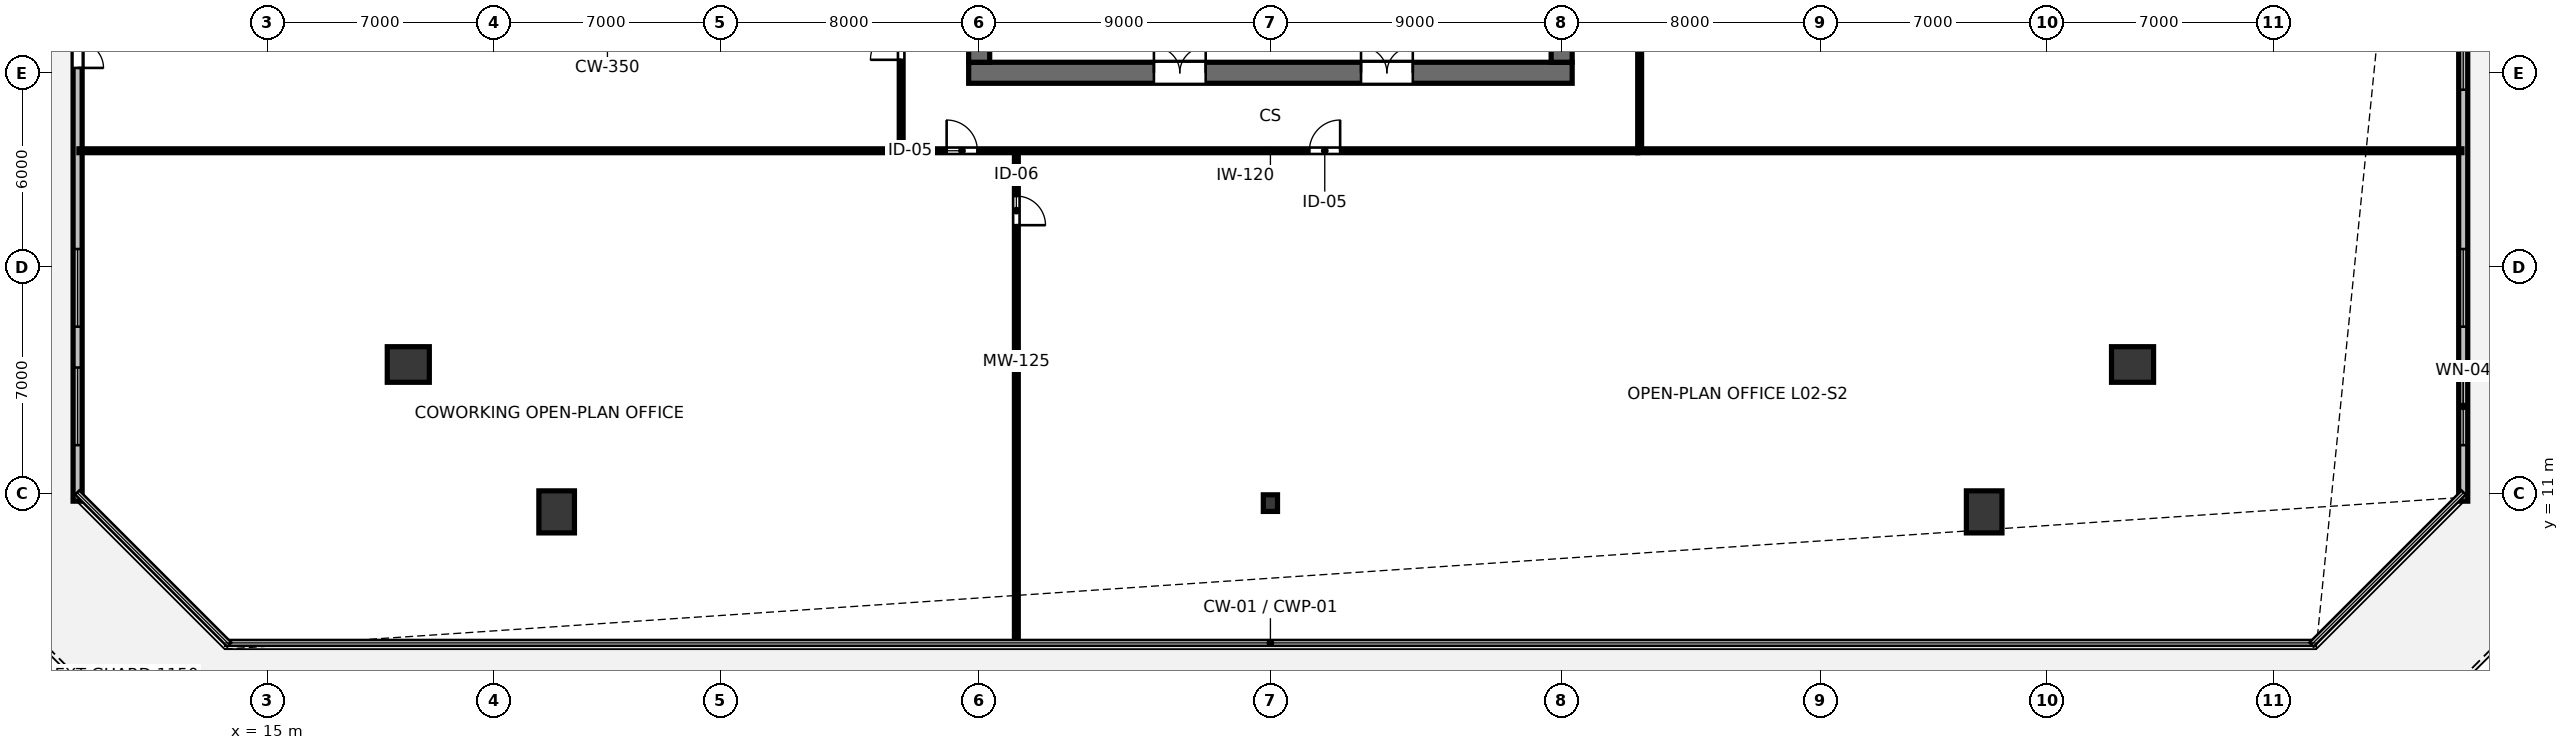
"""IFC4 building model, lengths in metres.
Left out: names, types, materials, properties, quantities, classifications, styles, units other than length and angle.
Written with IfcOpenShell. Run it as: python <this file> out.ifc"""

import sys

from ifc_helpers import new_model, si_unit, direction, frame, frame_2d, origin, origin_2d, place, context, subcontext, project, spatial, rectangle, hollow_rectangle, i_section, extrude, element, fill, save


model = new_model("IFC4")
c1 = context("Model", 3, precision=1e-05, world=origin(), true_north=direction((0.0, 1.0)))
c2 = subcontext(c1, "Body", "Model", "MODEL_VIEW")
j1 = project(units=[si_unit("LENGTHUNIT", "METRE"), si_unit("PLANEANGLEUNIT", "RADIAN")], contexts=[c1])
p1 = place(None, origin())
s1 = spatial("IfcSite", under=j1, at=p1, CompositionType="ELEMENT")
p2 = place(p1, origin())
s2 = spatial("IfcBuilding", under=s1, at=p2, CompositionType="ELEMENT")
p3 = place(p2, frame((0.0, 0.0, 9.5)))
s3 = spatial("IfcBuildingStorey", under=s2, at=p3, CompositionType="ELEMENT", Elevation=9.5)
p4 = place(p3, frame((36.675, 24.0, 0.0), z_axis=(0.0, 0.0, 1.0), x_axis=(1.0, 0.0, 0.0)))
e1 = element("IfcWall", 1, at=p4, inside=s3, PredefinedType="SHEAR", context=c2, shape_type="SweptSolid", body=[
    extrude(rectangle(XDim=18.65, YDim=0.65, at=frame_2d((9.325, 0.0))), origin(), (0.0, 0.0, 1.0), 4.22),
])
p5 = place(p4, frame((5.725, 0.0, 0.0)))
e2 = element("IfcOpeningElement", 2, at=p5, cuts=e1, PredefinedType="OPENING", context=c2, shape_type="SweptSolid", body=[
    extrude(rectangle(XDim=1.6, YDim=2.15, at=frame_2d((0.8, 1.075))), frame((0.0, 0.335, 0.0), z_axis=(0.0, -1.0, 0.0), x_axis=(1.0, 0.0, 0.0)), (0.0, 0.0, 1.0), 0.67),
])
p6 = place(p4, frame((12.125, 0.0, 0.0)))
e3 = element("IfcOpeningElement", 3, at=p6, cuts=e1, PredefinedType="OPENING", context=c2, shape_type="SweptSolid", body=[
    extrude(rectangle(XDim=1.6, YDim=2.15, at=frame_2d((0.8, 1.075))), frame((0.0, 0.335, 0.0), z_axis=(0.0, -1.0, 0.0), x_axis=(1.0, 0.0, 0.0)), (0.0, 0.0, 1.0), 0.67),
])
p7 = place(p3, frame((37.0, 24.325, 0.0), z_axis=(0.0, 0.0, 1.0), x_axis=(0.0, 1.0, 0.0)))
e4 = element("IfcWall", 4, at=p7, inside=s3, PredefinedType="SHEAR", context=c2, shape_type="SweptSolid", body=[
    extrude(rectangle(XDim=15.35, YDim=0.65, at=frame_2d((7.675, 0.0))), origin(), (0.0, 0.0, 1.0), 4.22),
])
p8 = place(p7, frame((5.2, 0.0, 0.0)))
e5 = element("IfcOpeningElement", 5, at=p8, cuts=e4, PredefinedType="OPENING", context=c2, shape_type="SweptSolid", body=[
    extrude(rectangle(XDim=1.15, YDim=2.15, at=frame_2d((0.575, 1.075))), frame((0.0, 0.335, 0.0), z_axis=(0.0, -1.0, 0.0), x_axis=(1.0, 0.0, 0.0)), (0.0, 0.0, 1.0), 0.67),
])
p9 = place(p3, frame((55.0, 24.325, 0.0), z_axis=(0.0, 0.0, 1.0), x_axis=(0.0, 1.0, 0.0)))
e6 = element("IfcWall", 6, at=p9, inside=s3, PredefinedType="SHEAR", context=c2, shape_type="SweptSolid", body=[
    extrude(rectangle(XDim=15.35, YDim=0.65, at=frame_2d((7.675, 0.0))), origin(), (0.0, 0.0, 1.0), 4.22),
])
p10 = place(p9, frame((5.2, 0.0, 0.0)))
e7 = element("IfcOpeningElement", 7, at=p10, cuts=e6, PredefinedType="OPENING", context=c2, shape_type="SweptSolid", body=[
    extrude(rectangle(XDim=1.15, YDim=2.15, at=frame_2d((0.575, 1.075))), frame((0.0, 0.335, 0.0), z_axis=(0.0, -1.0, 0.0), x_axis=(1.0, 0.0, 0.0)), (0.0, 0.0, 1.0), 0.67),
])
p11 = place(p3, frame((23.943, 10.429, 0.0), z_axis=(0.0, 0.0, 1.0), x_axis=(1.0, 0.0, 0.0)))
e8 = element("IfcColumn", 8, at=p11, inside=s3, PredefinedType="COLUMN", context=c2, shape_type="SweptSolid", body=[
    extrude(hollow_rectangle(XDim=1.1, YDim=1.3, WallThickness=0.07, at=origin_2d()), origin(), (0.0, 0.0, 1.0), 4.208),
])
p12 = place(p3, frame((46.0, 10.7, 0.0), z_axis=(0.0, 0.0, 1.0), x_axis=(1.0, 0.0, 0.0)))
e9 = element("IfcColumn", 9, at=p12, inside=s3, PredefinedType="COLUMN", context=c2, shape_type="SweptSolid", body=[
    extrude(i_section(OverallWidth=0.439, OverallDepth=0.514, WebThickness=0.06, FlangeThickness=0.097, FilletRadius=0.025, at=origin_2d()), origin(), (0.0, 0.0, 1.0), 4.208),
])
for number, where, z_axis, x_axis in (
    (10, (68.057, 10.429, 0.0), (0.0, 0.0, 1.0), (1.0, 0.0, 0.0)),
    (11, (72.642, 14.984, 0.0), (0.0, 0.0, 1.0), (0.0, 1.0, 0.0)),
    (12, (19.358, 14.984, 0.0), (0.0, 0.0, 1.0), (0.0, 1.0, 0.0)),
):
    element("IfcColumn", number, at=place(p3, frame(where, z_axis=z_axis, x_axis=x_axis)), inside=s3, PredefinedType="COLUMN", context=c2, shape_type="SweptSolid", body=[
        extrude(hollow_rectangle(XDim=1.1, YDim=1.3, WallThickness=0.07, at=origin_2d()), origin(), (0.0, 0.0, 1.0), 4.208),
    ])
p13 = place(p3, frame((82.86, 10.76, 0.0), z_axis=(0.0, 0.0, 1.0), x_axis=(0.0, 1.0, 0.0)))
e13 = element("IfcWall", 13, at=p13, inside=s3, PredefinedType="STANDARD", context=c2, shape_type="SweptSolid", body=[
    extrude(rectangle(XDim=42.48, YDim=0.28, at=frame_2d((21.24, 0.0))), origin(), (0.0, 0.0, 1.0), 4.21),
])
p14 = place(p13, frame((25.64, 0.0, 0.0)))
e14 = element("IfcOpeningElement", 14, at=p14, cuts=e13, PredefinedType="OPENING", context=c2, shape_type="SweptSolid", body=[
    extrude(rectangle(XDim=1.6, YDim=2.15, at=frame_2d((0.8, 1.075))), frame((0.0, 0.15, 0.0), z_axis=(0.0, -1.0, 0.0), x_axis=(1.0, 0.0, 0.0)), (0.0, 0.0, 1.0), 0.3),
])
p15 = place(p13, frame((1.731, 0.0, 0.85)))
e15 = element("IfcOpeningElement", 15, at=p15, cuts=e13, PredefinedType="OPENING", context=c2, shape_type="SweptSolid", body=[
    extrude(rectangle(XDim=2.4, YDim=2.4, at=frame_2d((1.2, 1.2))), frame((0.0, 0.15, 0.0), z_axis=(0.0, -1.0, 0.0), x_axis=(1.0, 0.0, 0.0)), (0.0, 0.0, 1.0), 0.3),
])
p16 = place(p13, frame((5.393, 0.0, 0.85)))
e16 = element("IfcOpeningElement", 16, at=p16, cuts=e13, PredefinedType="OPENING", context=c2, shape_type="SweptSolid", body=[
    extrude(rectangle(XDim=2.4, YDim=2.4, at=frame_2d((1.2, 1.2))), frame((0.0, 0.15, 0.0), z_axis=(0.0, -1.0, 0.0), x_axis=(1.0, 0.0, 0.0)), (0.0, 0.0, 1.0), 0.3),
])
p17 = place(p13, frame((12.716, 0.0, 0.85)))
e17 = element("IfcOpeningElement", 17, at=p17, cuts=e13, PredefinedType="OPENING", context=c2, shape_type="SweptSolid", body=[
    extrude(rectangle(XDim=2.4, YDim=2.4, at=frame_2d((1.2, 1.2))), frame((0.0, 0.15, 0.0), z_axis=(0.0, -1.0, 0.0), x_axis=(1.0, 0.0, 0.0)), (0.0, 0.0, 1.0), 0.3),
])
p18 = place(p13, frame((16.378, 0.0, 0.85)))
e18 = element("IfcOpeningElement", 18, at=p18, cuts=e13, PredefinedType="OPENING", context=c2, shape_type="SweptSolid", body=[
    extrude(rectangle(XDim=2.4, YDim=2.4, at=frame_2d((1.2, 1.2))), frame((0.0, 0.15, 0.0), z_axis=(0.0, -1.0, 0.0), x_axis=(1.0, 0.0, 0.0)), (0.0, 0.0, 1.0), 0.3),
])
p19 = place(p13, frame((20.04, 0.0, 0.85)))
e19 = element("IfcOpeningElement", 19, at=p19, cuts=e13, PredefinedType="OPENING", context=c2, shape_type="SweptSolid", body=[
    extrude(rectangle(XDim=2.4, YDim=2.4, at=frame_2d((1.2, 1.2))), frame((0.0, 0.15, 0.0), z_axis=(0.0, -1.0, 0.0), x_axis=(1.0, 0.0, 0.0)), (0.0, 0.0, 1.0), 0.3),
])
p20 = place(p13, frame((34.687, 0.0, 0.85)))
e20 = element("IfcOpeningElement", 20, at=p20, cuts=e13, PredefinedType="OPENING", context=c2, shape_type="SweptSolid", body=[
    extrude(rectangle(XDim=2.4, YDim=2.4, at=frame_2d((1.2, 1.2))), frame((0.0, 0.15, 0.0), z_axis=(0.0, -1.0, 0.0), x_axis=(1.0, 0.0, 0.0)), (0.0, 0.0, 1.0), 0.3),
])
p21 = place(p13, frame((38.349, 0.0, 0.85)))
e21 = element("IfcOpeningElement", 21, at=p21, cuts=e13, PredefinedType="OPENING", context=c2, shape_type="SweptSolid", body=[
    extrude(rectangle(XDim=2.4, YDim=2.4, at=frame_2d((1.2, 1.2))), frame((0.0, 0.15, 0.0), z_axis=(0.0, -1.0, 0.0), x_axis=(1.0, 0.0, 0.0)), (0.0, 0.0, 1.0), 0.3),
])
p22 = place(p3, frame((9.14, 53.24, 0.0), z_axis=(0.0, 0.0, 1.0), x_axis=(0.0, -1.0, 0.0)))
e22 = element("IfcWall", 22, at=p22, inside=s3, PredefinedType="STANDARD", context=c2, shape_type="SweptSolid", body=[
    extrude(rectangle(XDim=42.48, YDim=0.28, at=frame_2d((21.24, 0.0))), origin(), (0.0, 0.0, 1.0), 4.21),
])
p23 = place(p22, frame((27.49, 0.0, 0.0)))
e23 = element("IfcOpeningElement", 23, at=p23, cuts=e22, PredefinedType="OPENING", context=c2, shape_type="SweptSolid", body=[
    extrude(rectangle(XDim=1.6, YDim=2.15, at=frame_2d((0.8, 1.075))), frame((0.0, 0.15, 0.0), z_axis=(0.0, -1.0, 0.0), x_axis=(1.0, 0.0, 0.0)), (0.0, 0.0, 1.0), 0.3),
])
p24 = place(p22, frame((1.731, 0.0, 0.85)))
e24 = element("IfcOpeningElement", 24, at=p24, cuts=e22, PredefinedType="OPENING", context=c2, shape_type="SweptSolid", body=[
    extrude(rectangle(XDim=2.4, YDim=2.4, at=frame_2d((1.2, 1.2))), frame((0.0, 0.15, 0.0), z_axis=(0.0, -1.0, 0.0), x_axis=(1.0, 0.0, 0.0)), (0.0, 0.0, 1.0), 0.3),
])
p25 = place(p22, frame((5.393, 0.0, 0.85)))
e25 = element("IfcOpeningElement", 25, at=p25, cuts=e22, PredefinedType="OPENING", context=c2, shape_type="SweptSolid", body=[
    extrude(rectangle(XDim=2.4, YDim=2.4, at=frame_2d((1.2, 1.2))), frame((0.0, 0.15, 0.0), z_axis=(0.0, -1.0, 0.0), x_axis=(1.0, 0.0, 0.0)), (0.0, 0.0, 1.0), 0.3),
])
p26 = place(p22, frame((12.716, 0.0, 0.85)))
e26 = element("IfcOpeningElement", 26, at=p26, cuts=e22, PredefinedType="OPENING", context=c2, shape_type="SweptSolid", body=[
    extrude(rectangle(XDim=2.4, YDim=2.4, at=frame_2d((1.2, 1.2))), frame((0.0, 0.15, 0.0), z_axis=(0.0, -1.0, 0.0), x_axis=(1.0, 0.0, 0.0)), (0.0, 0.0, 1.0), 0.3),
])
p27 = place(p22, frame((20.04, 0.0, 0.85)))
e27 = element("IfcOpeningElement", 27, at=p27, cuts=e22, PredefinedType="OPENING", context=c2, shape_type="SweptSolid", body=[
    extrude(rectangle(XDim=2.4, YDim=2.4, at=frame_2d((1.2, 1.2))), frame((0.0, 0.15, 0.0), z_axis=(0.0, -1.0, 0.0), x_axis=(1.0, 0.0, 0.0)), (0.0, 0.0, 1.0), 0.3),
])
p28 = place(p22, frame((34.687, 0.0, 0.85)))
e28 = element("IfcOpeningElement", 28, at=p28, cuts=e22, PredefinedType="OPENING", context=c2, shape_type="SweptSolid", body=[
    extrude(rectangle(XDim=2.4, YDim=2.4, at=frame_2d((1.2, 1.2))), frame((0.0, 0.15, 0.0), z_axis=(0.0, -1.0, 0.0), x_axis=(1.0, 0.0, 0.0)), (0.0, 0.0, 1.0), 0.3),
])
p29 = place(p22, frame((38.349, 0.0, 0.85)))
e29 = element("IfcOpeningElement", 29, at=p29, cuts=e22, PredefinedType="OPENING", context=c2, shape_type="SweptSolid", body=[
    extrude(rectangle(XDim=2.4, YDim=2.4, at=frame_2d((1.2, 1.2))), frame((0.0, 0.15, 0.0), z_axis=(0.0, -1.0, 0.0), x_axis=(1.0, 0.0, 0.0)), (0.0, 0.0, 1.0), 0.3),
])
p30 = place(p3, frame((38.149, 21.59, 0.0), z_axis=(0.0, 0.0, 1.0), x_axis=(0.0, -1.0, 0.0)))
e30 = element("IfcWall", 30, at=p30, inside=s3, PredefinedType="MOVABLE", context=c2, shape_type="SweptSolid", body=[
    extrude(rectangle(XDim=15.21, YDim=0.12, at=frame_2d((7.605, 0.0))), origin(), (0.0, 0.0, 1.0), 3.31),
])
p31 = place(p30, frame((1.4, 0.0, 0.0)))
e31 = element("IfcOpeningElement", 31, at=p31, cuts=e30, PredefinedType="OPENING", context=c2, shape_type="SweptSolid", body=[
    extrude(rectangle(XDim=0.9, YDim=2.15, at=frame_2d((0.45, 1.075))), frame((0.0, 0.07, 0.0), z_axis=(0.0, -1.0, 0.0), x_axis=(1.0, 0.0, 0.0)), (0.0, 0.0, 1.0), 0.14),
])
p32 = place(p3, frame((34.65, 21.59, 0.0), z_axis=(0.0, 0.0, 1.0), x_axis=(1.0, 0.0, 0.0)))
e32 = element("IfcWall", 32, at=p32, inside=s3, PredefinedType="PARTITIONING", context=c2, shape_type="SweptSolid", body=[
    extrude(rectangle(XDim=22.7, YDim=0.12, at=frame_2d((11.35, 0.0))), origin(), (0.0, 0.0, 1.0), 3.31),
])
p33 = place(p32, frame((1.344, 0.0, 0.0)))
e33 = element("IfcOpeningElement", 33, at=p33, cuts=e32, PredefinedType="OPENING", context=c2, shape_type="SweptSolid", body=[
    extrude(rectangle(XDim=0.95, YDim=2.15, at=frame_2d((0.475, 1.075))), frame((0.0, 0.07, 0.0), z_axis=(0.0, -1.0, 0.0), x_axis=(1.0, 0.0, 0.0)), (0.0, 0.0, 1.0), 0.14),
])
p34 = place(p32, frame((12.554, 0.0, 0.0)))
e34 = element("IfcOpeningElement", 34, at=p34, cuts=e32, PredefinedType="OPENING", context=c2, shape_type="SweptSolid", body=[
    extrude(rectangle(XDim=0.95, YDim=2.15, at=frame_2d((0.475, 1.075))), frame((0.0, 0.07, 0.0), z_axis=(0.0, -1.0, 0.0), x_axis=(1.0, 0.0, 0.0)), (0.0, 0.0, 1.0), 0.14),
])
p35 = place(p3, frame((34.59, 21.65, 0.0), z_axis=(0.0, 0.0, 1.0), x_axis=(0.0, 1.0, 0.0)))
e35 = element("IfcWall", 35, at=p35, inside=s3, PredefinedType="PARTITIONING", context=c2, shape_type="SweptSolid", body=[
    extrude(rectangle(XDim=20.7, YDim=0.12, at=frame_2d((10.35, 0.0))), origin(), (0.0, 0.0, 1.0), 3.31),
])
p36 = place(p35, frame((2.751, 0.0, 0.0)))
e36 = element("IfcOpeningElement", 36, at=p36, cuts=e35, PredefinedType="OPENING", context=c2, shape_type="SweptSolid", body=[
    extrude(rectangle(XDim=0.95, YDim=2.15, at=frame_2d((0.475, 1.075))), frame((0.0, 0.07, 0.0), z_axis=(0.0, -1.0, 0.0), x_axis=(1.0, 0.0, 0.0)), (0.0, 0.0, 1.0), 0.14),
])
p37 = place(p35, frame((10.266, 0.0, 0.0)))
e37 = element("IfcOpeningElement", 37, at=p37, cuts=e35, PredefinedType="OPENING", context=c2, shape_type="SweptSolid", body=[
    extrude(rectangle(XDim=0.95, YDim=2.15, at=frame_2d((0.475, 1.075))), frame((0.0, 0.07, 0.0), z_axis=(0.0, -1.0, 0.0), x_axis=(1.0, 0.0, 0.0)), (0.0, 0.0, 1.0), 0.14),
])
p38 = place(p35, frame((17.39, 0.0, 0.0)))
e38 = element("IfcOpeningElement", 38, at=p38, cuts=e35, PredefinedType="OPENING", context=c2, shape_type="SweptSolid", body=[
    extrude(rectangle(XDim=0.95, YDim=2.15, at=frame_2d((0.475, 1.075))), frame((0.0, 0.07, 0.0), z_axis=(0.0, -1.0, 0.0), x_axis=(1.0, 0.0, 0.0)), (0.0, 0.0, 1.0), 0.14),
])
p39 = place(p3, frame((57.41, 21.65, 0.0), z_axis=(0.0, 0.0, 1.0), x_axis=(0.0, 1.0, 0.0)))
e39 = element("IfcWall", 39, at=p39, inside=s3, PredefinedType="PARTITIONING", context=c2, shape_type="SweptSolid", body=[
    extrude(rectangle(XDim=20.7, YDim=0.12, at=frame_2d((10.35, 0.0))), origin(), (0.0, 0.0, 1.0), 3.31),
])
p40 = place(p39, frame((9.875, 0.0, 0.0)))
e40 = element("IfcOpeningElement", 40, at=p40, cuts=e39, PredefinedType="OPENING", context=c2, shape_type="SweptSolid", body=[
    extrude(rectangle(XDim=0.95, YDim=2.15, at=frame_2d((0.475, 1.075))), frame((0.0, 0.07, 0.0), z_axis=(0.0, -1.0, 0.0), x_axis=(1.0, 0.0, 0.0)), (0.0, 0.0, 1.0), 0.14),
])
for number, where, z_axis, x_axis in (
    (41, (34.65, 21.59, 0.0), (0.0, 0.0, 1.0), (-1.0, 0.0, 0.0)),
    (42, (57.35, 21.59, 0.0), (0.0, 0.0, 1.0), (1.0, 0.0, 0.0)),
):
    element("IfcWall", number, at=place(p3, frame(where, z_axis=z_axis, x_axis=x_axis)), inside=s3, PredefinedType="PARTITIONING", context=c2, shape_type="SweptSolid", body=[
        extrude(rectangle(XDim=25.47, YDim=0.12, at=frame_2d((12.735, 0.0))), origin(), (0.0, 0.0, 1.0), 3.31),
    ])
p41 = place(p15, origin())
e43 = element("IfcWindow", 43, at=p41, inside=s3, PartitioningType="SINGLE_PANEL", PredefinedType="WINDOW", context=c2, shape_type="SweptSolid", body=[
    extrude(rectangle(XDim=2.4, YDim=2.4, at=frame_2d((1.2, 1.2))), frame((0.0, 0.03, 0.0), z_axis=(0.0, -1.0, 0.0), x_axis=(1.0, 0.0, 0.0)), (0.0, 0.0, 1.0), 0.06),
])
fill(e15, e43)
p42 = place(p16, origin())
e44 = element("IfcWindow", 44, at=p42, inside=s3, PartitioningType="SINGLE_PANEL", PredefinedType="WINDOW", context=c2, shape_type="SweptSolid", body=[
    extrude(rectangle(XDim=2.4, YDim=2.4, at=frame_2d((1.2, 1.2))), frame((0.0, 0.03, 0.0), z_axis=(0.0, -1.0, 0.0), x_axis=(1.0, 0.0, 0.0)), (0.0, 0.0, 1.0), 0.06),
])
fill(e16, e44)
p43 = place(p17, origin())
e45 = element("IfcWindow", 45, at=p43, inside=s3, PartitioningType="SINGLE_PANEL", PredefinedType="WINDOW", context=c2, shape_type="SweptSolid", body=[
    extrude(rectangle(XDim=2.4, YDim=2.4, at=frame_2d((1.2, 1.2))), frame((0.0, 0.03, 0.0), z_axis=(0.0, -1.0, 0.0), x_axis=(1.0, 0.0, 0.0)), (0.0, 0.0, 1.0), 0.06),
])
fill(e17, e45)
p44 = place(p23, origin())
e46 = element("IfcDoor", 46, at=p44, inside=s3, OperationType="DOUBLE_DOOR_SINGLE_SWING", PredefinedType="DOOR", context=c2, shape_type="SweptSolid", body=[
    extrude(rectangle(XDim=1.6, YDim=2.15, at=frame_2d((0.8, 1.075))), frame((0.0, 0.025, 0.0), z_axis=(0.0, -1.0, 0.0), x_axis=(1.0, 0.0, 0.0)), (0.0, 0.0, 1.0), 0.05),
])
fill(e23, e46)
p45 = place(p28, origin())
e47 = element("IfcWindow", 47, at=p45, inside=s3, PartitioningType="SINGLE_PANEL", PredefinedType="WINDOW", context=c2, shape_type="SweptSolid", body=[
    extrude(rectangle(XDim=2.4, YDim=2.4, at=frame_2d((1.2, 1.2))), frame((0.0, 0.03, 0.0), z_axis=(0.0, -1.0, 0.0), x_axis=(1.0, 0.0, 0.0)), (0.0, 0.0, 1.0), 0.06),
])
fill(e28, e47)
p46 = place(p29, origin())
e48 = element("IfcWindow", 48, at=p46, inside=s3, PartitioningType="SINGLE_PANEL", PredefinedType="WINDOW", context=c2, shape_type="SweptSolid", body=[
    extrude(rectangle(XDim=2.4, YDim=2.4, at=frame_2d((1.2, 1.2))), frame((0.0, 0.03, 0.0), z_axis=(0.0, -1.0, 0.0), x_axis=(1.0, 0.0, 0.0)), (0.0, 0.0, 1.0), 0.06),
])
fill(e29, e48)
p47 = place(p5, origin())
e49 = element("IfcDoor", 49, at=p47, inside=s3, OperationType="DOUBLE_DOOR_SINGLE_SWING", PredefinedType="DOOR", context=c2, shape_type="SweptSolid", body=[
    extrude(rectangle(XDim=1.6, YDim=2.15, at=frame_2d((0.8, 1.075))), frame((0.0, 0.025, 0.0), z_axis=(0.0, -1.0, 0.0), x_axis=(1.0, 0.0, 0.0)), (0.0, 0.0, 1.0), 0.05),
])
fill(e2, e49)
p48 = place(p6, origin())
e50 = element("IfcDoor", 50, at=p48, inside=s3, OperationType="DOUBLE_DOOR_SINGLE_SWING", PredefinedType="DOOR", context=c2, shape_type="SweptSolid", body=[
    extrude(rectangle(XDim=1.6, YDim=2.15, at=frame_2d((0.8, 1.075))), frame((0.0, 0.025, 0.0), z_axis=(0.0, -1.0, 0.0), x_axis=(1.0, 0.0, 0.0)), (0.0, 0.0, 1.0), 0.05),
])
fill(e3, e50)
p49 = place(p31, origin())
e51 = element("IfcDoor", 51, at=p49, inside=s3, OperationType="SINGLE_SWING_RIGHT", PredefinedType="DOOR", context=c2, shape_type="SweptSolid", body=[
    extrude(rectangle(XDim=0.9, YDim=2.15, at=frame_2d((0.45, 1.075))), frame((0.0, 0.025, 0.0), z_axis=(0.0, -1.0, 0.0), x_axis=(1.0, 0.0, 0.0)), (0.0, 0.0, 1.0), 0.05),
])
fill(e31, e51)
p50 = place(p33, origin())
e52 = element("IfcDoor", 52, at=p50, inside=s3, OperationType="SINGLE_SWING_LEFT", PredefinedType="DOOR", context=c2, shape_type="SweptSolid", body=[
    extrude(rectangle(XDim=0.95, YDim=2.15, at=frame_2d((0.475, 1.075))), frame((0.0, 0.025, 0.0), z_axis=(0.0, -1.0, 0.0), x_axis=(1.0, 0.0, 0.0)), (0.0, 0.0, 1.0), 0.05),
])
fill(e33, e52)
p51 = place(p34, origin())
e53 = element("IfcDoor", 53, at=p51, inside=s3, OperationType="SINGLE_SWING_RIGHT", PredefinedType="DOOR", context=c2, shape_type="SweptSolid", body=[
    extrude(rectangle(XDim=0.95, YDim=2.15, at=frame_2d((0.475, 1.075))), frame((0.0, 0.025, 0.0), z_axis=(0.0, -1.0, 0.0), x_axis=(1.0, 0.0, 0.0)), (0.0, 0.0, 1.0), 0.05),
])
fill(e34, e53)
p52 = place(p36, origin())
e54 = element("IfcDoor", 54, at=p52, inside=s3, OperationType="SINGLE_SWING_LEFT", PredefinedType="DOOR", context=c2, shape_type="SweptSolid", body=[
    extrude(rectangle(XDim=0.95, YDim=2.15, at=frame_2d((0.475, 1.075))), frame((0.0, 0.025, 0.0), z_axis=(0.0, -1.0, 0.0), x_axis=(1.0, 0.0, 0.0)), (0.0, 0.0, 1.0), 0.05),
])
fill(e36, e54)
save(model, sys.argv[1])
